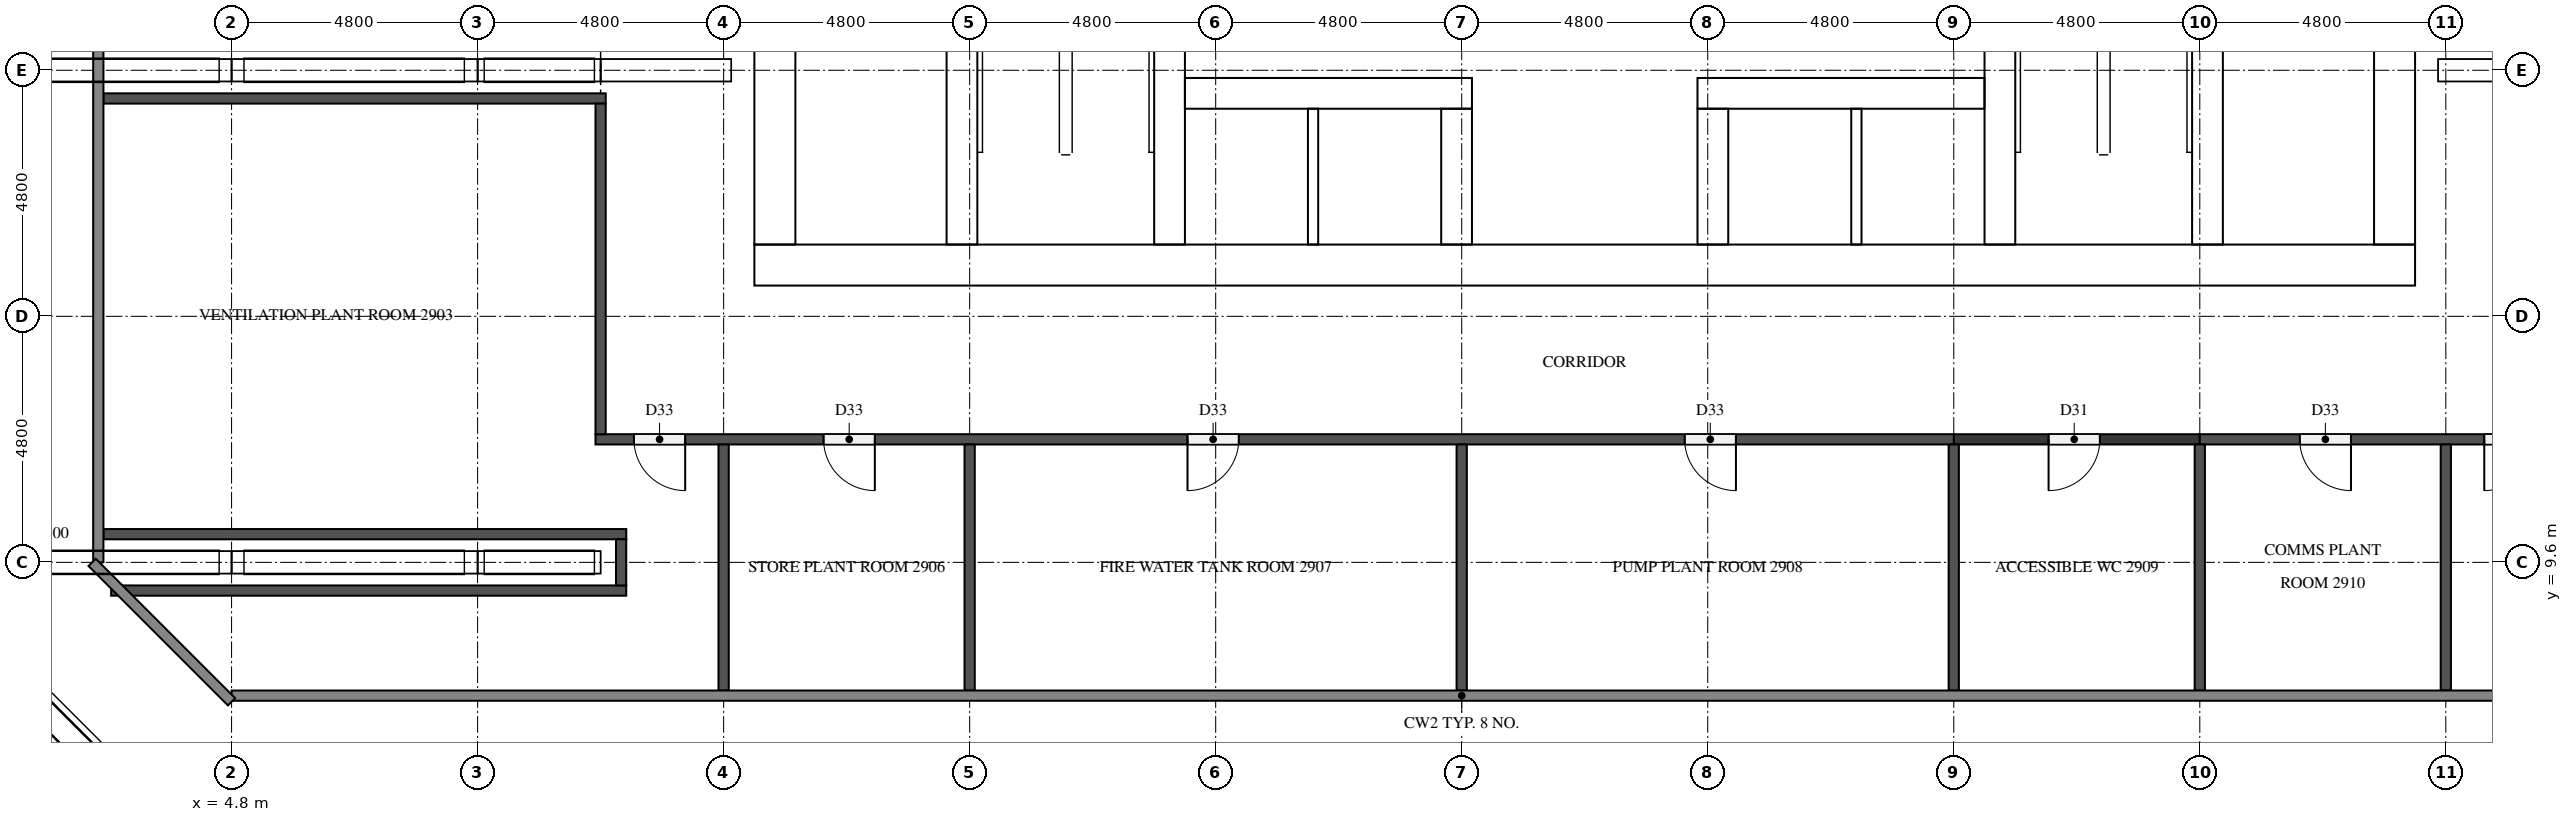
"""IFC4 building model, lengths in metres.
Left out: names, types, materials, properties, quantities, classifications, styles, units other than length and angle.
Written with IfcOpenShell. Run it as: python <this file> out.ifc"""

import sys

from ifc_helpers import new_model, si_unit, direction, frame, frame_2d, origin, place, context, subcontext, project, spatial, rectangle, extrude, element, fill, save


model = new_model("IFC4")
c1 = context("Model", 3, precision=1e-05, world=origin(), true_north=direction((0.0, 1.0)))
c2 = subcontext(c1, "Body", "Model", "MODEL_VIEW")
j1 = project(units=[si_unit("LENGTHUNIT", "METRE"), si_unit("PLANEANGLEUNIT", "RADIAN")], contexts=[c1])
p1 = place(None, origin())
s1 = spatial("IfcSite", under=j1, at=p1, CompositionType="ELEMENT")
p2 = place(p1, origin())
s2 = spatial("IfcBuilding", under=s1, at=p2, CompositionType="ELEMENT")
p3 = place(p2, frame((0.0, 0.0, 113.7)))
s3 = spatial("IfcBuildingStorey", under=s2, at=p3, CompositionType="ELEMENT", Elevation=113.7)
p4 = place(p3, frame((15.0, 15.4, 0.0), z_axis=(0.0, 0.0, 1.0), x_axis=(1.0, 0.0, 0.0)))
e1 = element("IfcWall", 1, at=p4, inside=s3, PredefinedType="SHEAR", context=c2, shape_type="SweptSolid", body=[
    extrude(rectangle(XDim=32.4, YDim=0.8, at=frame_2d((16.2, 0.0))), origin(), (0.0, 0.0, 1.0), 5.1),
])
p5 = place(p4, frame((15.3, 0.0, 0.0)))
e2 = element("IfcOpeningElement", 2, at=p5, cuts=e1, PredefinedType="OPENING", context=c2, shape_type="SweptSolid", body=[
    extrude(rectangle(XDim=1.8, YDim=2.1, at=frame_2d((0.9, 1.05))), frame((0.0, 0.41, 0.0), z_axis=(0.0, -1.0, 0.0), x_axis=(1.0, 0.0, 0.0)), (0.0, 0.0, 1.0), 0.82),
])
p6 = place(p3, frame((15.4, 15.8, 0.0), z_axis=(0.0, 0.0, 1.0), x_axis=(0.0, 1.0, 0.0)))
e3 = element("IfcWall", 3, at=p6, inside=s3, PredefinedType="SHEAR", context=c2, shape_type="SweptSolid", body=[
    extrude(rectangle(XDim=21.2, YDim=0.8, at=frame_2d((10.6, 0.0))), origin(), (0.0, 0.0, 1.0), 5.1),
])
p7 = place(p6, frame((4.96, 0.0, 0.0)))
e4 = element("IfcOpeningElement", 4, at=p7, cuts=e3, PredefinedType="OPENING", context=c2, shape_type="SweptSolid", body=[
    extrude(rectangle(XDim=1.2, YDim=2.1, at=frame_2d((0.6, 1.05))), frame((0.0, 0.41, 0.0), z_axis=(0.0, -1.0, 0.0), x_axis=(1.0, 0.0, 0.0)), (0.0, 0.0, 1.0), 0.82),
])
p8 = place(p3, frame((47.0, 15.8, 0.0), z_axis=(0.0, 0.0, 1.0), x_axis=(0.0, 1.0, 0.0)))
e5 = element("IfcWall", 5, at=p8, inside=s3, PredefinedType="SHEAR", context=c2, shape_type="SweptSolid", body=[
    extrude(rectangle(XDim=21.2, YDim=0.8, at=frame_2d((10.6, 0.0))), origin(), (0.0, 0.0, 1.0), 5.1),
])
p9 = place(p8, frame((10.3, 0.0, 0.0)))
e6 = element("IfcOpeningElement", 6, at=p9, cuts=e5, PredefinedType="OPENING", context=c2, shape_type="SweptSolid", body=[
    extrude(rectangle(XDim=1.2, YDim=2.1, at=frame_2d((0.6, 1.05))), frame((0.0, 0.41, 0.0), z_axis=(0.0, -1.0, 0.0), x_axis=(1.0, 0.0, 0.0)), (0.0, 0.0, 1.0), 0.82),
])
p10 = place(p3, frame((19.05, 15.8, 0.0), z_axis=(0.0, 0.0, 1.0), x_axis=(0.0, 1.0, 0.0)))
e7 = element("IfcWall", 7, at=p10, inside=s3, PredefinedType="SHEAR", context=c2, shape_type="SweptSolid", body=[
    extrude(rectangle(XDim=15.15, YDim=0.6, at=frame_2d((7.575, 0.0))), origin(), (0.0, 0.0, 1.0), 5.1),
])
p11 = place(p10, frame((9.65, 0.0, 0.0)))
e8 = element("IfcOpeningElement", 8, at=p11, cuts=e7, PredefinedType="OPENING", context=c2, shape_type="SweptSolid", body=[
    extrude(rectangle(XDim=1.1, YDim=2.1, at=frame_2d((0.55, 1.05))), frame((0.0, 0.31, 0.0), z_axis=(0.0, -1.0, 0.0), x_axis=(1.0, 0.0, 0.0)), (0.0, 0.0, 1.0), 0.62),
])
p12 = place(p10, frame((13.15, 0.0, 0.0)))
e9 = element("IfcOpeningElement", 9, at=p12, cuts=e7, PredefinedType="OPENING", context=c2, shape_type="SweptSolid", body=[
    extrude(rectangle(XDim=1.1, YDim=2.1, at=frame_2d((0.55, 1.05))), frame((0.0, 0.31, 0.0), z_axis=(0.0, -1.0, 0.0), x_axis=(1.0, 0.0, 0.0)), (0.0, 0.0, 1.0), 0.62),
])
p13 = place(p10, frame((0.4, 0.0, 0.0)))
e10 = element("IfcOpeningElement", 10, at=p13, cuts=e7, PredefinedType="OPENING", context=c2, shape_type="SweptSolid", body=[
    extrude(rectangle(XDim=1.2, YDim=2.1, at=frame_2d((0.6, 1.05))), frame((0.0, 0.31, 0.0), z_axis=(0.0, -1.0, 0.0), x_axis=(1.0, 0.0, 0.0)), (0.0, 0.0, 1.0), 0.62),
])
p14 = place(p3, frame((23.1, 15.8, 0.0), z_axis=(0.0, 0.0, 1.0), x_axis=(0.0, 1.0, 0.0)))
e11 = element("IfcWall", 11, at=p14, inside=s3, PredefinedType="SHEAR", context=c2, shape_type="SweptSolid", body=[
    extrude(rectangle(XDim=21.2, YDim=0.6, at=frame_2d((10.6, 0.0))), origin(), (0.0, 0.0, 1.0), 5.1),
])
p15 = place(p3, frame((39.3, 15.8, 0.0), z_axis=(0.0, 0.0, 1.0), x_axis=(0.0, 1.0, 0.0)))
e12 = element("IfcWall", 12, at=p15, inside=s3, PredefinedType="SHEAR", context=c2, shape_type="SweptSolid", body=[
    extrude(rectangle(XDim=8.45, YDim=0.6, at=frame_2d((4.225, 0.0))), origin(), (0.0, 0.0, 1.0), 5.1),
])
p16 = place(p3, frame((43.35, 15.8, 0.0), z_axis=(0.0, 0.0, 1.0), x_axis=(0.0, 1.0, 0.0)))
e13 = element("IfcWall", 13, at=p16, inside=s3, PredefinedType="SHEAR", context=c2, shape_type="SweptSolid", body=[
    extrude(rectangle(XDim=8.45, YDim=0.6, at=frame_2d((4.225, 0.0))), origin(), (0.0, 0.0, 1.0), 5.1),
])
p17 = place(p16, frame((0.4, 0.0, 0.0)))
e14 = element("IfcOpeningElement", 14, at=p17, cuts=e13, PredefinedType="OPENING", context=c2, shape_type="SweptSolid", body=[
    extrude(rectangle(XDim=1.2, YDim=2.1, at=frame_2d((0.6, 1.05))), frame((0.0, 0.31, 0.0), z_axis=(0.0, -1.0, 0.0), x_axis=(1.0, 0.0, 0.0)), (0.0, 0.0, 1.0), 0.62),
])
p18 = place(p3, frame((23.4, 18.75, 0.0), z_axis=(0.0, 0.0, 1.0), x_axis=(1.0, 0.0, 0.0)))
e15 = element("IfcWall", 15, at=p18, inside=s3, PredefinedType="SHEAR", context=c2, shape_type="SweptSolid", body=[
    extrude(rectangle(XDim=5.6, YDim=0.6, at=frame_2d((2.8, 0.0))), origin(), (0.0, 0.0, 1.0), 5.1),
])
p19 = place(p18, frame((0.65, 0.0, 0.0)))
e16 = element("IfcOpeningElement", 16, at=p19, cuts=e15, PredefinedType="OPENING", context=c2, shape_type="SweptSolid", body=[
    extrude(rectangle(XDim=1.1, YDim=2.1, at=frame_2d((0.55, 1.05))), frame((0.0, 0.31, 0.0), z_axis=(0.0, -1.0, 0.0), x_axis=(1.0, 0.0, 0.0)), (0.0, 0.0, 1.0), 0.62),
])
p20 = place(p18, frame((3.25, 0.0, 0.0)))
e17 = element("IfcOpeningElement", 17, at=p20, cuts=e15, PredefinedType="OPENING", context=c2, shape_type="SweptSolid", body=[
    extrude(rectangle(XDim=1.1, YDim=2.1, at=frame_2d((0.55, 1.05))), frame((0.0, 0.31, 0.0), z_axis=(0.0, -1.0, 0.0), x_axis=(1.0, 0.0, 0.0)), (0.0, 0.0, 1.0), 0.62),
])
p21 = place(p3, frame((33.4, 18.75, 0.0), z_axis=(0.0, 0.0, 1.0), x_axis=(1.0, 0.0, 0.0)))
e18 = element("IfcWall", 18, at=p21, inside=s3, PredefinedType="SHEAR", context=c2, shape_type="SweptSolid", body=[
    extrude(rectangle(XDim=5.6, YDim=0.6, at=frame_2d((2.8, 0.0))), origin(), (0.0, 0.0, 1.0), 5.1),
])
p22 = place(p21, frame((1.25, 0.0, 0.0)))
e19 = element("IfcOpeningElement", 19, at=p22, cuts=e18, PredefinedType="OPENING", context=c2, shape_type="SweptSolid", body=[
    extrude(rectangle(XDim=1.1, YDim=2.1, at=frame_2d((0.55, 1.05))), frame((0.0, 0.31, 0.0), z_axis=(0.0, -1.0, 0.0), x_axis=(1.0, 0.0, 0.0)), (0.0, 0.0, 1.0), 0.62),
])
p23 = place(p21, frame((3.85, 0.0, 0.0)))
e20 = element("IfcOpeningElement", 20, at=p23, cuts=e18, PredefinedType="OPENING", context=c2, shape_type="SweptSolid", body=[
    extrude(rectangle(XDim=1.1, YDim=2.1, at=frame_2d((0.55, 1.05))), frame((0.0, 0.31, 0.0), z_axis=(0.0, -1.0, 0.0), x_axis=(1.0, 0.0, 0.0)), (0.0, 0.0, 1.0), 0.62),
])
for number, where, z_axis, x_axis in (
    (21, (28.7, 15.8, 0.0), (0.0, 0.0, 1.0), (0.0, 1.0, 0.0)),
    (22, (33.7, 15.8, 0.0), (0.0, 0.0, 1.0), (0.0, 1.0, 0.0)),
):
    element("IfcWall", number, at=place(p3, frame(where, z_axis=z_axis, x_axis=x_axis)), inside=s3, PredefinedType="SHEAR", context=c2, shape_type="SweptSolid", body=[
        extrude(rectangle(XDim=2.65, YDim=0.6, at=frame_2d((1.325, 0.0))), origin(), (0.0, 0.0, 1.0), 5.1),
    ])
for number, where, z_axis, x_axis in (
    (23, (25.9, 15.8, 0.0), (0.0, 0.0, 1.0), (0.0, 1.0, 0.0)),
    (24, (36.5, 15.8, 0.0), (0.0, 0.0, 1.0), (0.0, 1.0, 0.0)),
):
    element("IfcWall", number, at=place(p3, frame(where, z_axis=z_axis, x_axis=x_axis)), inside=s3, PredefinedType="SOLIDWALL", context=c2, shape_type="SweptSolid", body=[
        extrude(rectangle(XDim=2.65, YDim=0.2, at=frame_2d((1.325, 0.0))), origin(), (0.0, 0.0, 1.0), 5.1),
    ])
p24 = place(p3, frame((2.45, 9.05, 0.0), z_axis=(0.0, 0.0, 1.0), x_axis=(1.0, 0.0, 0.0)))
e25 = element("IfcWall", 25, at=p24, inside=s3, PredefinedType="PARTITIONING", context=c2, shape_type="SweptSolid", body=[
    extrude(rectangle(XDim=10.05, YDim=0.2, at=frame_2d((5.025, 0.0))), origin(), (0.0, 0.0, 1.0), 5.1),
])
p25 = place(p3, frame((2.3, 10.15, 0.0), z_axis=(0.0, 0.0, 1.0), x_axis=(1.0, 0.0, 0.0)))
e26 = element("IfcWall", 26, at=p25, inside=s3, PredefinedType="PARTITIONING", context=c2, shape_type="SweptSolid", body=[
    extrude(rectangle(XDim=10.2, YDim=0.2, at=frame_2d((5.1, 0.0))), origin(), (0.0, 0.0, 1.0), 5.1),
])
p26 = place(p3, frame((43.2, 12.0, 0.0), z_axis=(0.0, 0.0, 1.0), x_axis=(-1.0, 0.0, 0.0)))
e27 = element("IfcWall", 27, at=p26, inside=s3, PredefinedType="PARTITIONING", context=c2, shape_type="SweptSolid", body=[
    extrude(rectangle(XDim=4.8, YDim=0.2, at=frame_2d((2.4, 0.0))), origin(), (0.0, 0.0, 1.0), 5.1),
])
p27 = place(p26, frame((1.95, 0.0, 0.0)))
e28 = element("IfcOpeningElement", 28, at=p27, cuts=e27, PredefinedType="OPENING", context=c2, shape_type="SweptSolid", body=[
    extrude(rectangle(XDim=1.0, YDim=2.1, at=frame_2d((0.5, 1.05))), frame((0.0, 0.11, 0.0), z_axis=(0.0, -1.0, 0.0), x_axis=(1.0, 0.0, 0.0)), (0.0, 0.0, 1.0), 0.22),
])
p28 = place(p3, frame((38.4, 12.0, 0.0), z_axis=(0.0, 0.0, 1.0), x_axis=(-1.0, 0.0, 0.0)))
e29 = element("IfcWall", 29, at=p28, inside=s3, PredefinedType="PARTITIONING", context=c2, shape_type="SweptSolid", body=[
    extrude(rectangle(XDim=26.5, YDim=0.2, at=frame_2d((13.25, 0.0))), origin(), (0.0, 0.0, 1.0), 5.1),
])
p29 = place(p28, frame((24.75, 0.0, 0.0)))
e30 = element("IfcOpeningElement", 30, at=p29, cuts=e29, PredefinedType="OPENING", context=c2, shape_type="SweptSolid", body=[
    extrude(rectangle(XDim=1.0, YDim=2.1, at=frame_2d((0.5, 1.05))), frame((0.0, 0.11, 0.0), z_axis=(0.0, -1.0, 0.0), x_axis=(1.0, 0.0, 0.0)), (0.0, 0.0, 1.0), 0.22),
])
p30 = place(p28, frame((21.05, 0.0, 0.0)))
e31 = element("IfcOpeningElement", 31, at=p30, cuts=e29, PredefinedType="OPENING", context=c2, shape_type="SweptSolid", body=[
    extrude(rectangle(XDim=1.0, YDim=2.1, at=frame_2d((0.5, 1.05))), frame((0.0, 0.11, 0.0), z_axis=(0.0, -1.0, 0.0), x_axis=(1.0, 0.0, 0.0)), (0.0, 0.0, 1.0), 0.22),
])
p31 = place(p28, frame((13.95, 0.0, 0.0)))
e32 = element("IfcOpeningElement", 32, at=p31, cuts=e29, PredefinedType="OPENING", context=c2, shape_type="SweptSolid", body=[
    extrude(rectangle(XDim=1.0, YDim=2.1, at=frame_2d((0.5, 1.05))), frame((0.0, 0.11, 0.0), z_axis=(0.0, -1.0, 0.0), x_axis=(1.0, 0.0, 0.0)), (0.0, 0.0, 1.0), 0.22),
])
p32 = place(p28, frame((4.25, 0.0, 0.0)))
e33 = element("IfcOpeningElement", 33, at=p32, cuts=e29, PredefinedType="OPENING", context=c2, shape_type="SweptSolid", body=[
    extrude(rectangle(XDim=1.0, YDim=2.1, at=frame_2d((0.5, 1.05))), frame((0.0, 0.11, 0.0), z_axis=(0.0, -1.0, 0.0), x_axis=(1.0, 0.0, 0.0)), (0.0, 0.0, 1.0), 0.22),
])
p33 = place(p3, frame((50.5, 12.0, 0.0), z_axis=(0.0, 0.0, 1.0), x_axis=(-1.0, 0.0, 0.0)))
e34 = element("IfcWall", 34, at=p33, inside=s3, PredefinedType="PARTITIONING", context=c2, shape_type="SweptSolid", body=[
    extrude(rectangle(XDim=7.3, YDim=0.2, at=frame_2d((3.65, 0.0))), origin(), (0.0, 0.0, 1.0), 5.1),
])
p34 = place(p33, frame((4.35, 0.0, 0.0)))
e35 = element("IfcOpeningElement", 35, at=p34, cuts=e34, PredefinedType="OPENING", context=c2, shape_type="SweptSolid", body=[
    extrude(rectangle(XDim=1.0, YDim=2.1, at=frame_2d((0.5, 1.05))), frame((0.0, 0.11, 0.0), z_axis=(0.0, -1.0, 0.0), x_axis=(1.0, 0.0, 0.0)), (0.0, 0.0, 1.0), 0.22),
])
p35 = place(p33, frame((0.75, 0.0, 0.0)))
e36 = element("IfcOpeningElement", 36, at=p35, cuts=e34, PredefinedType="OPENING", context=c2, shape_type="SweptSolid", body=[
    extrude(rectangle(XDim=1.0, YDim=2.1, at=frame_2d((0.5, 1.05))), frame((0.0, 0.11, 0.0), z_axis=(0.0, -1.0, 0.0), x_axis=(1.0, 0.0, 0.0)), (0.0, 0.0, 1.0), 0.22),
])
p36 = place(p3, frame((2.3, 18.65, 0.0), z_axis=(0.0, 0.0, 1.0), x_axis=(1.0, 0.0, 0.0)))
e37 = element("IfcWall", 37, at=p36, inside=s3, PredefinedType="PARTITIONING", context=c2, shape_type="SweptSolid", body=[
    extrude(rectangle(XDim=9.8, YDim=0.2, at=frame_2d((4.9, 0.0))), origin(), (0.0, 0.0, 1.0), 5.1),
])
p37 = place(p3, frame((12.0, 12.1, 0.0), z_axis=(0.0, 0.0, 1.0), x_axis=(0.0, 1.0, 0.0)))
e38 = element("IfcWall", 38, at=p37, inside=s3, PredefinedType="PARTITIONING", context=c2, shape_type="SweptSolid", body=[
    extrude(rectangle(XDim=6.45, YDim=0.2, at=frame_2d((3.225, 0.0))), origin(), (0.0, 0.0, 1.0), 5.1),
])
p38 = place(p3, frame((12.4, 9.15, 0.0), z_axis=(0.0, 0.0, 1.0), x_axis=(0.0, 1.0, 0.0)))
e39 = element("IfcWall", 39, at=p38, inside=s3, PredefinedType="PARTITIONING", context=c2, shape_type="SweptSolid", body=[
    extrude(rectangle(XDim=0.9, YDim=0.2, at=frame_2d((0.45, 0.0))), origin(), (0.0, 0.0, 1.0), 5.1),
])
for number, where, z_axis, x_axis in (
    (40, (14.4, 7.1, 0.0), (0.0, 0.0, 1.0), (0.0, 1.0, 0.0)),
    (41, (19.2, 7.1, 0.0), (0.0, 0.0, 1.0), (0.0, 1.0, 0.0)),
    (42, (28.8, 7.1, 0.0), (0.0, 0.0, 1.0), (0.0, 1.0, 0.0)),
    (43, (38.4, 7.1, 0.0), (0.0, 0.0, 1.0), (0.0, 1.0, 0.0)),
    (44, (43.2, 7.1, 0.0), (0.0, 0.0, 1.0), (0.0, 1.0, 0.0)),
    (45, (48.0, 7.1, 0.0), (0.0, 0.0, 1.0), (0.0, 1.0, 0.0)),
):
    element("IfcWall", number, at=place(p3, frame(where, z_axis=z_axis, x_axis=x_axis)), inside=s3, PredefinedType="PARTITIONING", context=c2, shape_type="SweptSolid", body=[
        extrude(rectangle(XDim=4.8, YDim=0.2, at=frame_2d((2.4, 0.0))), origin(), (0.0, 0.0, 1.0), 5.1),
    ])
p39 = place(p19, origin())
e46 = element("IfcDoor", 46, at=p39, inside=s3, OperationType="DOUBLE_DOOR_SLIDING", PredefinedType="DOOR", context=c2, shape_type="SweptSolid", body=[
    extrude(rectangle(XDim=1.1, YDim=2.1, at=frame_2d((0.55, 1.05))), frame((0.0, 0.025, 0.0), z_axis=(0.0, -1.0, 0.0), x_axis=(1.0, 0.0, 0.0)), (0.0, 0.0, 1.0), 0.05),
])
fill(e16, e46)
p40 = place(p20, origin())
e47 = element("IfcDoor", 47, at=p40, inside=s3, OperationType="DOUBLE_DOOR_SLIDING", PredefinedType="DOOR", context=c2, shape_type="SweptSolid", body=[
    extrude(rectangle(XDim=1.1, YDim=2.1, at=frame_2d((0.55, 1.05))), frame((0.0, 0.025, 0.0), z_axis=(0.0, -1.0, 0.0), x_axis=(1.0, 0.0, 0.0)), (0.0, 0.0, 1.0), 0.05),
])
fill(e17, e47)
p41 = place(p22, origin())
e48 = element("IfcDoor", 48, at=p41, inside=s3, OperationType="DOUBLE_DOOR_SLIDING", PredefinedType="DOOR", context=c2, shape_type="SweptSolid", body=[
    extrude(rectangle(XDim=1.1, YDim=2.1, at=frame_2d((0.55, 1.05))), frame((0.0, 0.025, 0.0), z_axis=(0.0, -1.0, 0.0), x_axis=(1.0, 0.0, 0.0)), (0.0, 0.0, 1.0), 0.05),
])
fill(e19, e48)
p42 = place(p23, origin())
e49 = element("IfcDoor", 49, at=p42, inside=s3, OperationType="DOUBLE_DOOR_SLIDING", PredefinedType="DOOR", context=c2, shape_type="SweptSolid", body=[
    extrude(rectangle(XDim=1.1, YDim=2.1, at=frame_2d((0.55, 1.05))), frame((0.0, 0.025, 0.0), z_axis=(0.0, -1.0, 0.0), x_axis=(1.0, 0.0, 0.0)), (0.0, 0.0, 1.0), 0.05),
])
fill(e20, e49)
p43 = place(p13, frame((1.2, 0.0, 0.0), z_axis=(0.0, 0.0, 1.0), x_axis=(-1.0, 0.0, 0.0)))
e50 = element("IfcDoor", 50, at=p43, inside=s3, OperationType="SINGLE_SWING_LEFT", PredefinedType="DOOR", context=c2, shape_type="SweptSolid", body=[
    extrude(rectangle(XDim=1.2, YDim=2.1, at=frame_2d((0.6, 1.05))), frame((0.0, 0.025, 0.0), z_axis=(0.0, -1.0, 0.0), x_axis=(1.0, 0.0, 0.0)), (0.0, 0.0, 1.0), 0.05),
])
fill(e10, e50)
p44 = place(p17, origin())
e51 = element("IfcDoor", 51, at=p44, inside=s3, OperationType="SINGLE_SWING_RIGHT", PredefinedType="DOOR", context=c2, shape_type="SweptSolid", body=[
    extrude(rectangle(XDim=1.2, YDim=2.1, at=frame_2d((0.6, 1.05))), frame((0.0, 0.025, 0.0), z_axis=(0.0, -1.0, 0.0), x_axis=(1.0, 0.0, 0.0)), (0.0, 0.0, 1.0), 0.05),
])
fill(e14, e51)
p45 = place(p5, frame((1.8, 0.0, 0.0), z_axis=(0.0, 0.0, 1.0), x_axis=(-1.0, 0.0, 0.0)))
e52 = element("IfcDoor", 52, at=p45, inside=s3, OperationType="DOUBLE_DOOR_SINGLE_SWING", PredefinedType="DOOR", context=c2, shape_type="SweptSolid", body=[
    extrude(rectangle(XDim=1.8, YDim=2.1, at=frame_2d((0.9, 1.05))), frame((0.0, 0.025, 0.0), z_axis=(0.0, -1.0, 0.0), x_axis=(1.0, 0.0, 0.0)), (0.0, 0.0, 1.0), 0.05),
])
fill(e2, e52)
p46 = place(p29, origin())
e53 = element("IfcDoor", 53, at=p46, inside=s3, OperationType="SINGLE_SWING_LEFT", PredefinedType="DOOR", context=c2, shape_type="SweptSolid", body=[
    extrude(rectangle(XDim=1.0, YDim=2.1, at=frame_2d((0.5, 1.05))), frame((0.0, 0.025, 0.0), z_axis=(0.0, -1.0, 0.0), x_axis=(1.0, 0.0, 0.0)), (0.0, 0.0, 1.0), 0.05),
])
fill(e30, e53)
p47 = place(p30, origin())
e54 = element("IfcDoor", 54, at=p47, inside=s3, OperationType="SINGLE_SWING_LEFT", PredefinedType="DOOR", context=c2, shape_type="SweptSolid", body=[
    extrude(rectangle(XDim=1.0, YDim=2.1, at=frame_2d((0.5, 1.05))), frame((0.0, 0.025, 0.0), z_axis=(0.0, -1.0, 0.0), x_axis=(1.0, 0.0, 0.0)), (0.0, 0.0, 1.0), 0.05),
])
fill(e31, e54)
p48 = place(p31, origin())
e55 = element("IfcDoor", 55, at=p48, inside=s3, OperationType="SINGLE_SWING_RIGHT", PredefinedType="DOOR", context=c2, shape_type="SweptSolid", body=[
    extrude(rectangle(XDim=1.0, YDim=2.1, at=frame_2d((0.5, 1.05))), frame((0.0, 0.025, 0.0), z_axis=(0.0, -1.0, 0.0), x_axis=(1.0, 0.0, 0.0)), (0.0, 0.0, 1.0), 0.05),
])
fill(e32, e55)
p49 = place(p32, origin())
e56 = element("IfcDoor", 56, at=p49, inside=s3, OperationType="SINGLE_SWING_LEFT", PredefinedType="DOOR", context=c2, shape_type="SweptSolid", body=[
    extrude(rectangle(XDim=1.0, YDim=2.1, at=frame_2d((0.5, 1.05))), frame((0.0, 0.025, 0.0), z_axis=(0.0, -1.0, 0.0), x_axis=(1.0, 0.0, 0.0)), (0.0, 0.0, 1.0), 0.05),
])
fill(e33, e56)
p50 = place(p27, origin())
e57 = element("IfcDoor", 57, at=p50, inside=s3, OperationType="SINGLE_SWING_RIGHT", PredefinedType="DOOR", context=c2, shape_type="SweptSolid", body=[
    extrude(rectangle(XDim=1.0, YDim=2.1, at=frame_2d((0.5, 1.05))), frame((0.0, 0.025, 0.0), z_axis=(0.0, -1.0, 0.0), x_axis=(1.0, 0.0, 0.0)), (0.0, 0.0, 1.0), 0.05),
])
fill(e28, e57)
p51 = place(p34, origin())
e58 = element("IfcDoor", 58, at=p51, inside=s3, OperationType="SINGLE_SWING_LEFT", PredefinedType="DOOR", context=c2, shape_type="SweptSolid", body=[
    extrude(rectangle(XDim=1.0, YDim=2.1, at=frame_2d((0.5, 1.05))), frame((0.0, 0.025, 0.0), z_axis=(0.0, -1.0, 0.0), x_axis=(1.0, 0.0, 0.0)), (0.0, 0.0, 1.0), 0.05),
])
fill(e35, e58)
p52 = place(p35, origin())
e59 = element("IfcDoor", 59, at=p52, inside=s3, OperationType="SINGLE_SWING_RIGHT", PredefinedType="DOOR", context=c2, shape_type="SweptSolid", body=[
    extrude(rectangle(XDim=1.0, YDim=2.1, at=frame_2d((0.5, 1.05))), frame((0.0, 0.025, 0.0), z_axis=(0.0, -1.0, 0.0), x_axis=(1.0, 0.0, 0.0)), (0.0, 0.0, 1.0), 0.05),
])
fill(e36, e59)
save(model, sys.argv[1])
